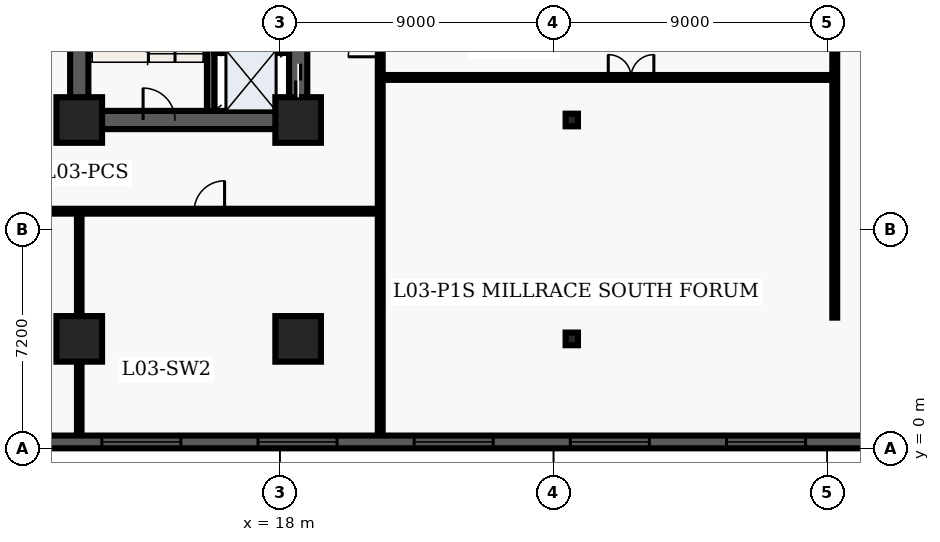
"""IFC4 building model, lengths in metres.
Left out: names, types, materials, properties, quantities, classifications, styles, units other than length and angle.
Written with IfcOpenShell. Run it as: python <this file> out.ifc"""

import sys

from ifc_helpers import new_model, entity, si_unit, converted_unit, direction, frame, origin_with_axes, origin_2d_with_axis, place, context, subcontext, project, spatial, polyline, rectangle, i_section, outline, extrude, element, fill, save


model = new_model("IFC4")
c1 = context("Model", 3, precision=1e-05, world=origin_with_axes(), true_north=direction((0.0, 1.0)))
c2 = subcontext(c1, "Body", "Model", "MODEL_VIEW")
j1 = project(units=[si_unit("LENGTHUNIT", "METRE"), converted_unit("PLANEANGLEUNIT", "DEGREE", entity("IfcPlaneAngleMeasure", 0.017), si_unit("PLANEANGLEUNIT", "RADIAN"), dimensions=[0, 0, 0, 0, 0, 0, 0])], contexts=[c1])
p1 = place(None, origin_with_axes())
s1 = spatial("IfcSite", under=j1, at=p1, CompositionType="ELEMENT")
p2 = place(p1, origin_with_axes())
s2 = spatial("IfcBuilding", under=s1, at=p2, CompositionType="ELEMENT")
p3 = place(p2, frame((0.0, 0.0, 15.3), z_axis=(0.0, 0.0, 1.0), x_axis=(1.0, 0.0, 0.0)))
s3 = spatial("IfcBuildingStorey", under=s2, at=p3, CompositionType="ELEMENT", Elevation=15.3)
p4 = place(p3, frame((11.4, 10.8, 0.0), z_axis=(0.0, 0.0, 1.0), x_axis=(0.0, 1.0, 0.0)))
e1 = element("IfcWall", 1, at=p4, inside=s3, PredefinedType="SHEAR", context=c2, shape_type="SweptSolid", body=[
    extrude(outline(polyline([(0.0, -0.3), (27.0, -0.3), (27.0, 0.3), (0.0, 0.3), (0.0, -0.3)])), origin_with_axes(), (0.0, 0.0, 1.0), 4.26),
])
p5 = place(p3, frame((11.4, 10.8, 0.0), z_axis=(0.0, 0.0, 1.0), x_axis=(1.0, 0.0, 0.0)))
e2 = element("IfcWall", 2, at=p5, inside=s3, PredefinedType="SHEAR", context=c2, shape_type="SweptSolid", body=[
    extrude(outline(polyline([(0.0, -0.3), (7.2, -0.3), (7.2, 0.3), (0.0, 0.3), (0.0, -0.3)])), origin_with_axes(), (0.0, 0.0, 1.0), 4.26),
])
p6 = place(p5, frame((2.625, 0.0, 0.0), z_axis=(0.0, 0.0, 1.0), x_axis=(1.0, 0.0, 0.0)))
e3 = element("IfcOpeningElement", 3, at=p6, cuts=e2, PredefinedType="OPENING", context=c2, shape_type="SweptSolid", body=[
    extrude(rectangle(XDim=1.05, YDim=0.62, at=origin_2d_with_axis()), origin_with_axes(), (0.0, 0.0, 1.0), 2.15),
])
p7 = place(p3, frame((18.6, 10.8, 0.0), z_axis=(0.0, 0.0, 1.0), x_axis=(0.0, 1.0, 0.0)))
e4 = element("IfcWall", 4, at=p7, inside=s3, PredefinedType="SHEAR", context=c2, shape_type="SweptSolid", body=[
    extrude(outline(polyline([(0.0, -0.3), (13.5, -0.3), (13.5, 0.3), (0.0, 0.3), (0.0, -0.3)])), origin_with_axes(), (0.0, 0.0, 1.0), 4.26),
])
p8 = place(p7, frame((1.3, 0.0, 0.0), z_axis=(0.0, 0.0, 1.0), x_axis=(1.0, 0.0, 0.0)))
e5 = element("IfcOpeningElement", 5, at=p8, cuts=e4, PredefinedType="OPENING", context=c2, shape_type="SweptSolid", body=[
    extrude(rectangle(XDim=1.1, YDim=0.62, at=origin_2d_with_axis()), origin_with_axes(), (0.0, 0.0, 1.0), 2.15),
])
p9 = place(p7, frame((3.4, 0.0, 0.0), z_axis=(0.0, 0.0, 1.0), x_axis=(1.0, 0.0, 0.0)))
e6 = element("IfcOpeningElement", 6, at=p9, cuts=e4, PredefinedType="OPENING", context=c2, shape_type="SweptSolid", body=[
    extrude(rectangle(XDim=1.1, YDim=0.62, at=origin_2d_with_axis()), origin_with_axes(), (0.0, 0.0, 1.0), 2.15),
])
p10 = place(p7, frame((11.125, 0.0, 0.0), z_axis=(0.0, 0.0, 1.0), x_axis=(1.0, 0.0, 0.0)))
e7 = element("IfcOpeningElement", 7, at=p10, cuts=e4, PredefinedType="OPENING", context=c2, shape_type="SweptSolid", body=[
    extrude(rectangle(XDim=1.05, YDim=0.62, at=origin_2d_with_axis()), origin_with_axes(), (0.0, 0.0, 1.0), 2.15),
])
p11 = place(p3, frame((15.725, 11.1, 0.0), z_axis=(0.0, 0.0, 1.0), x_axis=(0.0, 1.0, 0.0)))
e8 = element("IfcWall", 8, at=p11, inside=s3, PredefinedType="SHEAR", context=c2, shape_type="SweptSolid", body=[
    extrude(outline(polyline([(0.0, -0.125), (8.6, -0.125), (8.6, 0.125), (0.0, 0.125), (0.0, -0.125)])), origin_with_axes(), (0.0, 0.0, 1.0), 4.26),
])
for number, where, z_axis, x_axis in (
    (9, (11.4, 3.6, 0.0), (0.0, 0.0, 1.0), (1.0, 0.0, 0.0)),
    (10, (11.4, 10.8, 0.0), (0.0, 0.0, 1.0), (1.0, 0.0, 0.0)),
    (11, (18.6, 3.6, 0.0), (0.0, 0.0, 1.0), (1.0, 0.0, 0.0)),
    (12, (18.6, 10.8, 0.0), (0.0, 0.0, 1.0), (1.0, 0.0, 0.0)),
):
    element("IfcColumn", number, at=place(p3, frame(where, z_axis=z_axis, x_axis=x_axis)), inside=s3, PredefinedType="COLUMN", context=c2, shape_type="SweptSolid", body=[
        extrude(rectangle(XDim=1.5, YDim=1.5, at=origin_2d_with_axis()), origin_with_axes(), (0.0, 0.0, 1.0), 4.5),
    ])
for number, where, z_axis, x_axis in (
    (13, (27.6, 3.6, 0.0), (0.0, 0.0, 1.0), (1.0, 0.0, 0.0)),
    (14, (27.6, 10.8, 0.0), (0.0, 0.0, 1.0), (1.0, 0.0, 0.0)),
):
    element("IfcColumn", number, at=place(p3, frame(where, z_axis=z_axis, x_axis=x_axis)), inside=s3, PredefinedType="COLUMN", context=c2, shape_type="SweptSolid", body=[
        extrude(i_section(OverallWidth=0.406, OverallDepth=0.416, WebThickness=0.03, FlangeThickness=0.048, FilletRadius=0.022, at=origin_2d_with_axis()), origin_with_axes(), (0.0, 0.0, 1.0), 4.5),
    ])
p12 = place(p3, frame((15.84, 13.13, 0.0), z_axis=(0.0, 0.0, 1.0), x_axis=(1.0, 0.0, 0.0)))
e15 = element("IfcWall", 15, at=p12, inside=s3, PredefinedType="SOLIDWALL", context=c2, shape_type="SweptSolid", body=[
    extrude(outline(polyline([(0.0, -0.125), (2.46, -0.125), (2.46, 0.125), (0.0, 0.125), (0.0, -0.125)])), origin_with_axes(), (0.0, 0.0, 1.0), 3.2),
])
p13 = place(p3, frame((0.38, 7.8, 0.0), z_axis=(0.0, 0.0, 1.0), x_axis=(1.0, 0.0, 0.0)))
e16 = element("IfcWall", 16, at=p13, inside=s3, PredefinedType="PARTITIONING", context=c2, shape_type="SweptSolid", body=[
    extrude(outline(polyline([(0.0, -0.08), (20.92, -0.08), (20.92, 0.08), (0.0, 0.08), (0.0, -0.08)])), origin_with_axes(), (0.0, 0.0, 1.0), 3.2),
])
p14 = place(p13, frame((3.7, 0.0, 0.0), z_axis=(0.0, 0.0, 1.0), x_axis=(1.0, 0.0, 0.0)))
e17 = element("IfcOpeningElement", 17, at=p14, cuts=e16, PredefinedType="OPENING", context=c2, shape_type="SweptSolid", body=[
    extrude(rectangle(XDim=1.0, YDim=0.18, at=origin_2d_with_axis()), origin_with_axes(), (0.0, 0.0, 1.0), 2.15),
])
p15 = place(p13, frame((15.3, 0.0, 0.0), z_axis=(0.0, 0.0, 1.0), x_axis=(1.0, 0.0, 0.0)))
e18 = element("IfcOpeningElement", 18, at=p15, cuts=e16, PredefinedType="OPENING", context=c2, shape_type="SweptSolid", body=[
    extrude(rectangle(XDim=1.0, YDim=0.18, at=origin_2d_with_axis()), origin_with_axes(), (0.0, 0.0, 1.0), 2.15),
])
p16 = place(p3, frame((11.4, 0.38, 0.0), z_axis=(0.0, 0.0, 1.0), x_axis=(0.0, 1.0, 0.0)))
e19 = element("IfcWall", 19, at=p16, inside=s3, PredefinedType="PARTITIONING", context=c2, shape_type="SweptSolid", body=[
    extrude(outline(polyline([(0.0, -0.075), (7.42, -0.075), (7.42, 0.075), (0.0, 0.075), (0.0, -0.075)])), origin_with_axes(), (0.0, 0.0, 1.0), 3.2),
])
p17 = place(p3, frame((21.3, 0.38, 0.0), z_axis=(0.0, 0.0, 1.0), x_axis=(0.0, 1.0, 0.0)))
e20 = element("IfcWall", 20, at=p17, inside=s3, PredefinedType="PARTITIONING", context=c2, shape_type="SweptSolid", body=[
    extrude(outline(polyline([(0.0, -0.08), (38.84, -0.08), (38.84, 0.08), (0.0, 0.08), (0.0, -0.08)])), origin_with_axes(), (0.0, 0.0, 1.0), 3.2),
])
p18 = place(p17, frame((13.025, 0.0, 0.0), z_axis=(0.0, 0.0, 1.0), x_axis=(1.0, 0.0, 0.0)))
e21 = element("IfcOpeningElement", 21, at=p18, cuts=e20, PredefinedType="OPENING", context=c2, shape_type="SweptSolid", body=[
    extrude(rectangle(XDim=1.05, YDim=0.18, at=origin_2d_with_axis()), origin_with_axes(), (0.0, 0.0, 1.0), 2.15),
])
p19 = place(p17, frame((31.25, 0.0, 0.0), z_axis=(0.0, 0.0, 1.0), x_axis=(1.0, 0.0, 0.0)))
e22 = element("IfcOpeningElement", 22, at=p19, cuts=e20, PredefinedType="OPENING", context=c2, shape_type="SweptSolid", body=[
    extrude(rectangle(XDim=1.5, YDim=0.18, at=origin_2d_with_axis()), origin_with_axes(), (0.0, 0.0, 1.0), 2.2),
])
p20 = place(p3, frame((21.3, 12.2, 0.0), z_axis=(0.0, 0.0, 1.0), x_axis=(1.0, 0.0, 0.0)))
e23 = element("IfcWall", 23, at=p20, inside=s3, PredefinedType="PARTITIONING", context=c2, shape_type="SweptSolid", body=[
    extrude(outline(polyline([(0.0, -0.08), (14.95, -0.08), (14.95, 0.08), (0.0, 0.08), (0.0, -0.08)])), origin_with_axes(), (0.0, 0.0, 1.0), 3.2),
])
p21 = place(p20, frame((8.25, 0.0, 0.0), z_axis=(0.0, 0.0, 1.0), x_axis=(1.0, 0.0, 0.0)))
e24 = element("IfcOpeningElement", 24, at=p21, cuts=e23, PredefinedType="OPENING", context=c2, shape_type="SweptSolid", body=[
    extrude(rectangle(XDim=1.5, YDim=0.18, at=origin_2d_with_axis()), origin_with_axes(), (0.0, 0.0, 1.0), 2.2),
])
p22 = place(p3, frame((36.25, 4.3, 0.0), z_axis=(0.0, 0.0, 1.0), x_axis=(0.0, 1.0, 0.0)))
e25 = element("IfcWall", 25, at=p22, inside=s3, PredefinedType="PARTITIONING", context=c2, shape_type="SweptSolid", body=[
    extrude(outline(polyline([(0.0, -0.08), (22.5, -0.08), (22.5, 0.08), (0.0, 0.08), (0.0, -0.08)])), origin_with_axes(), (0.0, 0.0, 1.0), 3.2),
])
p23 = place(p3, frame((67.98, 0.21, 0.0), z_axis=(0.0, 0.0, 1.0), x_axis=(-1.0, 0.0, 0.0)))
e26 = element("IfcWall", 26, at=p23, inside=s3, PredefinedType="SOLIDWALL", context=c2, shape_type="SweptSolid", body=[
    extrude(outline(polyline([(0.0, -0.21), (67.98, -0.21), (67.98, 0.21), (0.0, 0.21), (0.0, -0.21)])), origin_with_axes(), (0.0, 0.0, 1.0), 4.26),
])
p24 = place(p23, frame((3.168, 0.0, 0.45), z_axis=(0.0, 0.0, 1.0), x_axis=(1.0, 0.0, 0.0)))
e27 = element("IfcOpeningElement", 27, at=p24, cuts=e26, PredefinedType="OPENING", context=c2, shape_type="SweptSolid", body=[
    extrude(rectangle(XDim=2.6, YDim=0.44, at=origin_2d_with_axis()), origin_with_axes(), (0.0, 0.0, 1.0), 2.8),
])
p25 = place(p23, frame((8.305, 0.0, 0.45), z_axis=(0.0, 0.0, 1.0), x_axis=(1.0, 0.0, 0.0)))
e28 = element("IfcOpeningElement", 28, at=p25, cuts=e26, PredefinedType="OPENING", context=c2, shape_type="SweptSolid", body=[
    extrude(rectangle(XDim=2.6, YDim=0.44, at=origin_2d_with_axis()), origin_with_axes(), (0.0, 0.0, 1.0), 2.8),
])
p26 = place(p23, frame((13.442, 0.0, 0.45), z_axis=(0.0, 0.0, 1.0), x_axis=(1.0, 0.0, 0.0)))
e29 = element("IfcOpeningElement", 29, at=p26, cuts=e26, PredefinedType="OPENING", context=c2, shape_type="SweptSolid", body=[
    extrude(rectangle(XDim=2.6, YDim=0.44, at=origin_2d_with_axis()), origin_with_axes(), (0.0, 0.0, 1.0), 2.8),
])
p27 = place(p23, frame((19.429, 0.0, 0.45), z_axis=(0.0, 0.0, 1.0), x_axis=(1.0, 0.0, 0.0)))
e30 = element("IfcOpeningElement", 30, at=p27, cuts=e26, PredefinedType="OPENING", context=c2, shape_type="SweptSolid", body=[
    extrude(rectangle(XDim=2.6, YDim=0.44, at=origin_2d_with_axis()), origin_with_axes(), (0.0, 0.0, 1.0), 2.8),
])
p28 = place(p23, frame((23.716, 0.0, 0.45), z_axis=(0.0, 0.0, 1.0), x_axis=(1.0, 0.0, 0.0)))
e31 = element("IfcOpeningElement", 31, at=p28, cuts=e26, PredefinedType="OPENING", context=c2, shape_type="SweptSolid", body=[
    extrude(rectangle(XDim=2.6, YDim=0.44, at=origin_2d_with_axis()), origin_with_axes(), (0.0, 0.0, 1.0), 2.8),
])
p29 = place(p23, frame((28.853, 0.0, 0.45), z_axis=(0.0, 0.0, 1.0), x_axis=(1.0, 0.0, 0.0)))
e32 = element("IfcOpeningElement", 32, at=p29, cuts=e26, PredefinedType="OPENING", context=c2, shape_type="SweptSolid", body=[
    extrude(rectangle(XDim=2.6, YDim=0.44, at=origin_2d_with_axis()), origin_with_axes(), (0.0, 0.0, 1.0), 2.8),
])
p30 = place(p23, frame((33.99, 0.0, 0.45), z_axis=(0.0, 0.0, 1.0), x_axis=(1.0, 0.0, 0.0)))
e33 = element("IfcOpeningElement", 33, at=p30, cuts=e26, PredefinedType="OPENING", context=c2, shape_type="SweptSolid", body=[
    extrude(rectangle(XDim=2.6, YDim=0.44, at=origin_2d_with_axis()), origin_with_axes(), (0.0, 0.0, 1.0), 2.8),
])
p31 = place(p23, frame((39.127, 0.0, 0.45), z_axis=(0.0, 0.0, 1.0), x_axis=(1.0, 0.0, 0.0)))
e34 = element("IfcOpeningElement", 34, at=p31, cuts=e26, PredefinedType="OPENING", context=c2, shape_type="SweptSolid", body=[
    extrude(rectangle(XDim=2.6, YDim=0.44, at=origin_2d_with_axis()), origin_with_axes(), (0.0, 0.0, 1.0), 2.8),
])
p32 = place(p23, frame((44.264, 0.0, 0.45), z_axis=(0.0, 0.0, 1.0), x_axis=(1.0, 0.0, 0.0)))
e35 = element("IfcOpeningElement", 35, at=p32, cuts=e26, PredefinedType="OPENING", context=c2, shape_type="SweptSolid", body=[
    extrude(rectangle(XDim=2.6, YDim=0.44, at=origin_2d_with_axis()), origin_with_axes(), (0.0, 0.0, 1.0), 2.8),
])
p33 = place(p23, frame((49.401, 0.0, 0.45), z_axis=(0.0, 0.0, 1.0), x_axis=(1.0, 0.0, 0.0)))
e36 = element("IfcOpeningElement", 36, at=p33, cuts=e26, PredefinedType="OPENING", context=c2, shape_type="SweptSolid", body=[
    extrude(rectangle(XDim=2.6, YDim=0.44, at=origin_2d_with_axis()), origin_with_axes(), (0.0, 0.0, 1.0), 2.8),
])
p34 = place(p23, frame((54.538, 0.0, 0.45), z_axis=(0.0, 0.0, 1.0), x_axis=(1.0, 0.0, 0.0)))
e37 = element("IfcOpeningElement", 37, at=p34, cuts=e26, PredefinedType="OPENING", context=c2, shape_type="SweptSolid", body=[
    extrude(rectangle(XDim=2.6, YDim=0.44, at=origin_2d_with_axis()), origin_with_axes(), (0.0, 0.0, 1.0), 2.8),
])
p35 = place(p23, frame((59.675, 0.0, 0.45), z_axis=(0.0, 0.0, 1.0), x_axis=(1.0, 0.0, 0.0)))
e38 = element("IfcOpeningElement", 38, at=p35, cuts=e26, PredefinedType="OPENING", context=c2, shape_type="SweptSolid", body=[
    extrude(rectangle(XDim=2.6, YDim=0.44, at=origin_2d_with_axis()), origin_with_axes(), (0.0, 0.0, 1.0), 2.8),
])
p36 = place(p23, frame((64.812, 0.0, 0.45), z_axis=(0.0, 0.0, 1.0), x_axis=(1.0, 0.0, 0.0)))
e39 = element("IfcOpeningElement", 39, at=p36, cuts=e26, PredefinedType="OPENING", context=c2, shape_type="SweptSolid", body=[
    extrude(rectangle(XDim=2.6, YDim=0.44, at=origin_2d_with_axis()), origin_with_axes(), (0.0, 0.0, 1.0), 2.8),
])
p37 = place(p7, frame((1.3, 0.0, 0.0), z_axis=(0.0, 0.0, 1.0), x_axis=(1.0, 0.0, 0.0)))
e40 = element("IfcDoor", 40, at=p37, inside=s3, OperationType="SLIDING_TO_LEFT", PredefinedType="DOOR", context=c2, shape_type="SweptSolid", body=[
    extrude(rectangle(XDim=1.1, YDim=0.09, at=origin_2d_with_axis()), origin_with_axes(), (0.0, 0.0, 1.0), 2.15),
])
fill(e5, e40)
p38 = place(p5, frame((2.625, 0.0, 0.0), z_axis=(0.0, 0.0, 1.0), x_axis=(1.0, 0.0, 0.0)))
e41 = element("IfcDoor", 41, at=p38, inside=s3, OperationType="SINGLE_SWING_LEFT", PredefinedType="DOOR", context=c2, shape_type="SweptSolid", body=[
    extrude(rectangle(XDim=1.05, YDim=0.09, at=origin_2d_with_axis()), origin_with_axes(), (0.0, 0.0, 1.0), 2.15),
])
fill(e3, e41)
p39 = place(p17, frame((13.025, 0.0, 0.0), z_axis=(0.0, 0.0, 1.0), x_axis=(1.0, 0.0, 0.0)))
e42 = element("IfcDoor", 42, at=p39, inside=s3, OperationType="SINGLE_SWING_LEFT", PredefinedType="DOOR", context=c2, shape_type="SweptSolid", body=[
    extrude(rectangle(XDim=1.05, YDim=0.09, at=origin_2d_with_axis()), origin_with_axes(), (0.0, 0.0, 1.0), 2.15),
])
fill(e21, e42)
p40 = place(p13, frame((15.3, 0.0, 0.0), z_axis=(0.0, 0.0, 1.0), x_axis=(1.0, 0.0, 0.0)))
e43 = element("IfcDoor", 43, at=p40, inside=s3, OperationType="SINGLE_SWING_RIGHT", PredefinedType="DOOR", context=c2, shape_type="SweptSolid", body=[
    extrude(rectangle(XDim=1.0, YDim=0.09, at=origin_2d_with_axis()), origin_with_axes(), (0.0, 0.0, 1.0), 2.15),
])
fill(e18, e43)
p41 = place(p20, frame((8.25, 0.0, 0.0), z_axis=(0.0, 0.0, 1.0), x_axis=(1.0, 0.0, 0.0)))
e44 = element("IfcDoor", 44, at=p41, inside=s3, OperationType="DOUBLE_DOOR_SINGLE_SWING", PredefinedType="DOOR", context=c2, shape_type="SweptSolid", body=[
    extrude(rectangle(XDim=1.5, YDim=0.09, at=origin_2d_with_axis()), origin_with_axes(), (0.0, 0.0, 1.0), 2.2),
])
fill(e24, e44)
p42 = place(p23, frame((33.99, 0.0, 0.45), z_axis=(0.0, 0.0, 1.0), x_axis=(1.0, 0.0, 0.0)))
e45 = element("IfcWindow", 45, at=p42, inside=s3, PredefinedType="WINDOW", context=c2, shape_type="SweptSolid", body=[
    extrude(rectangle(XDim=2.6, YDim=0.09, at=origin_2d_with_axis()), origin_with_axes(), (0.0, 0.0, 1.0), 2.8),
])
fill(e33, e45)
p43 = place(p23, frame((39.127, 0.0, 0.45), z_axis=(0.0, 0.0, 1.0), x_axis=(1.0, 0.0, 0.0)))
e46 = element("IfcWindow", 46, at=p43, inside=s3, PredefinedType="WINDOW", context=c2, shape_type="SweptSolid", body=[
    extrude(rectangle(XDim=2.6, YDim=0.09, at=origin_2d_with_axis()), origin_with_axes(), (0.0, 0.0, 1.0), 2.8),
])
fill(e34, e46)
p44 = place(p23, frame((44.264, 0.0, 0.45), z_axis=(0.0, 0.0, 1.0), x_axis=(1.0, 0.0, 0.0)))
e47 = element("IfcWindow", 47, at=p44, inside=s3, PredefinedType="WINDOW", context=c2, shape_type="SweptSolid", body=[
    extrude(rectangle(XDim=2.6, YDim=0.09, at=origin_2d_with_axis()), origin_with_axes(), (0.0, 0.0, 1.0), 2.8),
])
fill(e35, e47)
p45 = place(p23, frame((49.401, 0.0, 0.45), z_axis=(0.0, 0.0, 1.0), x_axis=(1.0, 0.0, 0.0)))
e48 = element("IfcWindow", 48, at=p45, inside=s3, PredefinedType="WINDOW", context=c2, shape_type="SweptSolid", body=[
    extrude(rectangle(XDim=2.6, YDim=0.09, at=origin_2d_with_axis()), origin_with_axes(), (0.0, 0.0, 1.0), 2.8),
])
fill(e36, e48)
p46 = place(p23, frame((54.538, 0.0, 0.45), z_axis=(0.0, 0.0, 1.0), x_axis=(1.0, 0.0, 0.0)))
e49 = element("IfcWindow", 49, at=p46, inside=s3, PredefinedType="WINDOW", context=c2, shape_type="SweptSolid", body=[
    extrude(rectangle(XDim=2.6, YDim=0.09, at=origin_2d_with_axis()), origin_with_axes(), (0.0, 0.0, 1.0), 2.8),
])
fill(e37, e49)
save(model, sys.argv[1])
